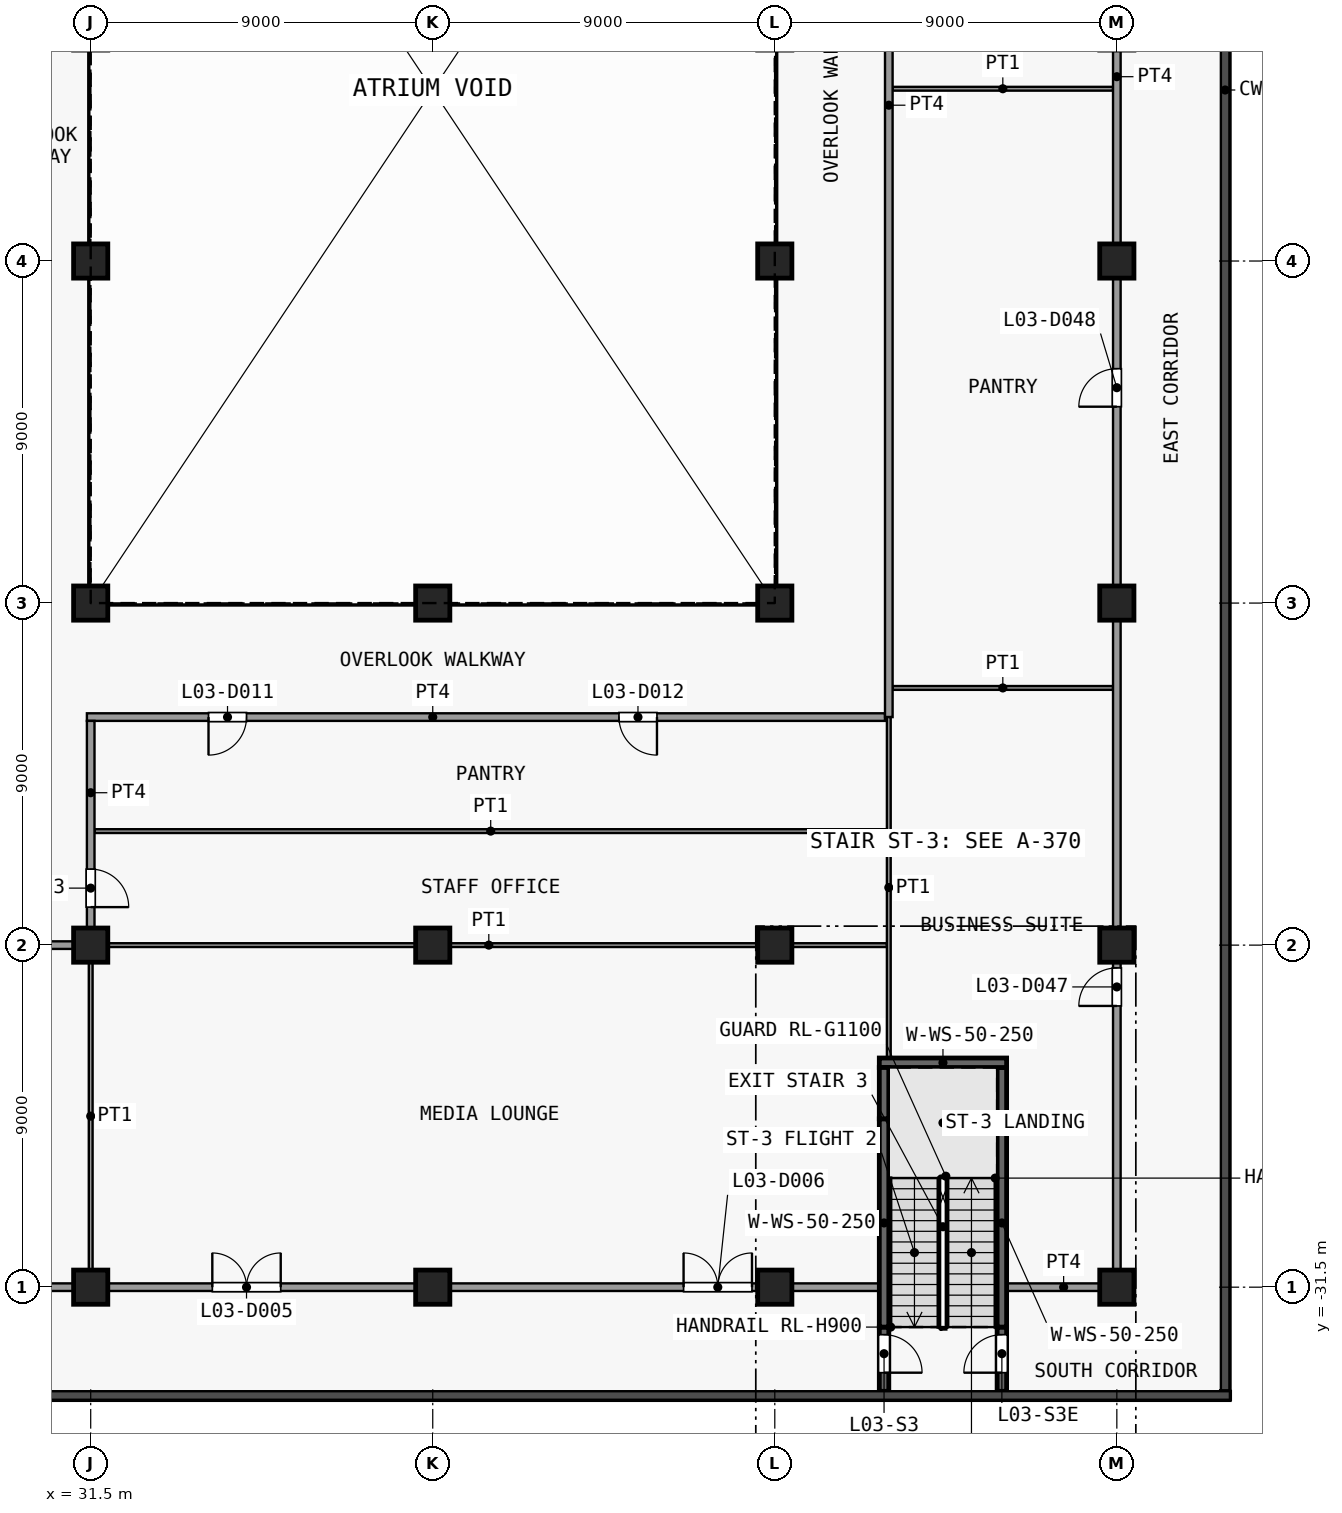
"""IFC4 building model, lengths in metres.
Left out: names, types, materials, properties, quantities, classifications, styles, units other than length and angle.
Written with IfcOpenShell. Run it as: python <this file> out.ifc"""

import sys

from ifc_helpers import new_model, si_unit, direction, frame, frame_2d, origin, origin_2d, place, context, subcontext, project, spatial, rectangle, extrude, element, fill, save


model = new_model("IFC4")
c1 = context("Model", 3, precision=1e-05, world=origin(), true_north=direction((0.0, 1.0)))
c2 = subcontext(c1, "Body", "Model", "MODEL_VIEW")
j1 = project(units=[si_unit("LENGTHUNIT", "METRE"), si_unit("PLANEANGLEUNIT", "RADIAN")], contexts=[c1])
p1 = place(None, origin())
s1 = spatial("IfcSite", under=j1, at=p1, CompositionType="ELEMENT")
p2 = place(p1, origin())
s2 = spatial("IfcBuilding", under=s1, at=p2, CompositionType="ELEMENT")
p3 = place(p2, frame((0.0, 0.0, 18.5)))
s3 = spatial("IfcBuildingStorey", under=s2, at=p3, CompositionType="ELEMENT", Elevation=18.5)
for number, where, z_axis, x_axis in (
    (1, (31.5, -31.5, 0.0), (0.0, 0.0, 1.0), (1.0, 0.0, 0.0)),
    (2, (31.5, -22.5, 0.0), (0.0, 0.0, 1.0), (1.0, 0.0, 0.0)),
    (3, (31.5, -13.5, 0.0), (0.0, 0.0, 1.0), (1.0, 0.0, 0.0)),
    (4, (31.5, -4.5, 0.0), (0.0, 0.0, 1.0), (1.0, 0.0, 0.0)),
    (5, (40.5, -31.5, 0.0), (0.0, 0.0, 1.0), (1.0, 0.0, 0.0)),
    (6, (40.5, -22.5, 0.0), (0.0, 0.0, 1.0), (1.0, 0.0, 0.0)),
    (7, (40.5, -13.5, 0.0), (0.0, 0.0, 1.0), (1.0, 0.0, 0.0)),
    (8, (49.5, -31.5, 0.0), (0.0, 0.0, 1.0), (1.0, 0.0, 0.0)),
    (9, (49.5, -22.5, 0.0), (0.0, 0.0, 1.0), (1.0, 0.0, 0.0)),
    (10, (49.5, -13.5, 0.0), (0.0, 0.0, 1.0), (1.0, 0.0, 0.0)),
    (11, (49.5, -4.5, 0.0), (0.0, 0.0, 1.0), (1.0, 0.0, 0.0)),
    (12, (58.5, -31.5, 0.0), (0.0, 0.0, 1.0), (1.0, 0.0, 0.0)),
    (13, (58.5, -22.5, 0.0), (0.0, 0.0, 1.0), (1.0, 0.0, 0.0)),
    (14, (58.5, -13.5, 0.0), (0.0, 0.0, 1.0), (1.0, 0.0, 0.0)),
    (15, (58.5, -4.5, 0.0), (0.0, 0.0, 1.0), (1.0, 0.0, 0.0)),
):
    element("IfcColumn", number, at=place(p3, frame(where, z_axis=z_axis, x_axis=x_axis)), inside=s3, PredefinedType="COLUMN", context=c2, shape_type="SweptSolid", body=[
        extrude(rectangle(XDim=0.9, YDim=0.9, at=origin_2d()), origin(), (0.0, 0.0, 1.0), 5.0),
    ])
p4 = place(p3, frame((52.375, -32.55, 0.0), z_axis=(0.0, 0.0, 1.0), x_axis=(0.0, -1.0, 0.0)))
e16 = element("IfcWall", 16, at=p4, inside=s3, PredefinedType="SHEAR", context=c2, shape_type="SweptSolid", body=[
    extrude(rectangle(XDim=1.69, YDim=0.25, at=frame_2d((0.845, 0.0))), origin(), (0.0, 0.0, 1.0), 4.65),
])
p5 = place(p4, frame((0.2, 0.0, 0.0)))
e17 = element("IfcOpeningElement", 17, at=p5, cuts=e16, PredefinedType="OPENING", context=c2, shape_type="SweptSolid", body=[
    extrude(rectangle(XDim=1.0, YDim=2.1, at=frame_2d((0.5, 1.05))), frame((0.0, 0.135, 0.0), z_axis=(0.0, -1.0, 0.0), x_axis=(1.0, 0.0, 0.0)), (0.0, 0.0, 1.0), 0.27),
])
p6 = place(p3, frame((52.375, -32.55, 0.0), z_axis=(0.0, 0.0, 1.0), x_axis=(0.0, 1.0, 0.0)))
e18 = element("IfcWall", 18, at=p6, inside=s3, PredefinedType="SHEAR", context=c2, shape_type="SweptSolid", body=[
    extrude(rectangle(XDim=5.48, YDim=0.25, at=frame_2d((2.74, 0.0))), origin(), (0.0, 0.0, 1.0), 4.65),
])
p7 = place(p3, frame((52.375, -27.07, 0.0), z_axis=(0.0, 0.0, 1.0), x_axis=(0.0, 1.0, 0.0)))
e19 = element("IfcWall", 19, at=p7, inside=s3, PredefinedType="SHEAR", context=c2, shape_type="SweptSolid", body=[
    extrude(rectangle(XDim=1.35, YDim=0.25, at=frame_2d((0.675, 0.0))), origin(), (0.0, 0.0, 1.0), 4.65),
])
p8 = place(p3, frame((55.475, -34.24, 0.0), z_axis=(0.0, 0.0, 1.0), x_axis=(0.0, 1.0, 0.0)))
e20 = element("IfcWall", 20, at=p8, inside=s3, PredefinedType="SHEAR", context=c2, shape_type="SweptSolid", body=[
    extrude(rectangle(XDim=1.69, YDim=0.25, at=frame_2d((0.845, 0.0))), origin(), (0.0, 0.0, 1.0), 4.65),
])
p9 = place(p8, frame((0.49, 0.0, 0.0)))
e21 = element("IfcOpeningElement", 21, at=p9, cuts=e20, PredefinedType="OPENING", context=c2, shape_type="SweptSolid", body=[
    extrude(rectangle(XDim=1.0, YDim=2.1, at=frame_2d((0.5, 1.05))), frame((0.0, 0.135, 0.0), z_axis=(0.0, -1.0, 0.0), x_axis=(1.0, 0.0, 0.0)), (0.0, 0.0, 1.0), 0.27),
])
p10 = place(p3, frame((55.475, -32.55, 0.0), z_axis=(0.0, 0.0, 1.0), x_axis=(0.0, 1.0, 0.0)))
e22 = element("IfcWall", 22, at=p10, inside=s3, PredefinedType="SHEAR", context=c2, shape_type="SweptSolid", body=[
    extrude(rectangle(XDim=5.48, YDim=0.25, at=frame_2d((2.74, 0.0))), origin(), (0.0, 0.0, 1.0), 4.65),
])
p11 = place(p3, frame((55.475, -27.07, 0.0), z_axis=(0.0, 0.0, 1.0), x_axis=(0.0, 1.0, 0.0)))
e23 = element("IfcWall", 23, at=p11, inside=s3, PredefinedType="SHEAR", context=c2, shape_type="SweptSolid", body=[
    extrude(rectangle(XDim=1.35, YDim=0.25, at=frame_2d((0.675, 0.0))), origin(), (0.0, 0.0, 1.0), 4.65),
])
p12 = place(p3, frame((52.25, -25.595, 0.0), z_axis=(0.0, 0.0, 1.0), x_axis=(1.0, 0.0, 0.0)))
e24 = element("IfcWall", 24, at=p12, inside=s3, PredefinedType="SHEAR", context=c2, shape_type="SweptSolid", body=[
    extrude(rectangle(XDim=3.35, YDim=0.25, at=frame_2d((1.675, 0.0))), origin(), (0.0, 0.0, 1.0), 4.65),
])
p13 = place(p3, frame((-25.9, -31.5, 0.0), z_axis=(0.0, 0.0, 1.0), x_axis=(1.0, 0.0, 0.0)))
e25 = element("IfcWall", 25, at=p13, inside=s3, PredefinedType="PARTITIONING", context=c2, shape_type="SweptSolid", body=[
    extrude(rectangle(XDim=78.15, YDim=0.2, at=frame_2d((39.075, 0.0))), origin(), (0.0, 0.0, 1.0), 4.65),
])
p14 = place(p13, frame((12.6, 0.0, 0.0)))
e26 = element("IfcOpeningElement", 26, at=p14, cuts=e25, PredefinedType="OPENING", context=c2, shape_type="SweptSolid", body=[
    extrude(rectangle(XDim=1.0, YDim=2.1, at=frame_2d((0.5, 1.05))), frame((0.0, 0.11, 0.0), z_axis=(0.0, -1.0, 0.0), x_axis=(1.0, 0.0, 0.0)), (0.0, 0.0, 1.0), 0.22),
])
p15 = place(p13, frame((25.2, 0.0, 0.0)))
e27 = element("IfcOpeningElement", 27, at=p15, cuts=e25, PredefinedType="OPENING", context=c2, shape_type="SweptSolid", body=[
    extrude(rectangle(XDim=1.0, YDim=2.1, at=frame_2d((0.5, 1.05))), frame((0.0, 0.11, 0.0), z_axis=(0.0, -1.0, 0.0), x_axis=(1.0, 0.0, 0.0)), (0.0, 0.0, 1.0), 0.22),
])
p16 = place(p13, frame((34.0, 0.0, 0.0)))
e28 = element("IfcOpeningElement", 28, at=p16, cuts=e25, PredefinedType="OPENING", context=c2, shape_type="SweptSolid", body=[
    extrude(rectangle(XDim=1.8, YDim=2.1, at=frame_2d((0.9, 1.05))), frame((0.0, 0.11, 0.0), z_axis=(0.0, -1.0, 0.0), x_axis=(1.0, 0.0, 0.0)), (0.0, 0.0, 1.0), 0.22),
])
p17 = place(p13, frame((51.0, 0.0, 0.0)))
e29 = element("IfcOpeningElement", 29, at=p17, cuts=e25, PredefinedType="OPENING", context=c2, shape_type="SweptSolid", body=[
    extrude(rectangle(XDim=1.8, YDim=2.1, at=frame_2d((0.9, 1.05))), frame((0.0, 0.11, 0.0), z_axis=(0.0, -1.0, 0.0), x_axis=(1.0, 0.0, 0.0)), (0.0, 0.0, 1.0), 0.22),
])
p18 = place(p13, frame((60.6, 0.0, 0.0)))
e30 = element("IfcOpeningElement", 30, at=p18, cuts=e25, PredefinedType="OPENING", context=c2, shape_type="SweptSolid", body=[
    extrude(rectangle(XDim=1.8, YDim=2.1, at=frame_2d((0.9, 1.05))), frame((0.0, 0.11, 0.0), z_axis=(0.0, -1.0, 0.0), x_axis=(1.0, 0.0, 0.0)), (0.0, 0.0, 1.0), 0.22),
])
p19 = place(p13, frame((73.0, 0.0, 0.0)))
e31 = element("IfcOpeningElement", 31, at=p19, cuts=e25, PredefinedType="OPENING", context=c2, shape_type="SweptSolid", body=[
    extrude(rectangle(XDim=1.8, YDim=2.1, at=frame_2d((0.9, 1.05))), frame((0.0, 0.11, 0.0), z_axis=(0.0, -1.0, 0.0), x_axis=(1.0, 0.0, 0.0)), (0.0, 0.0, 1.0), 0.22),
])
p20 = place(p3, frame((55.6, -31.5, 0.0), z_axis=(0.0, 0.0, 1.0), x_axis=(1.0, 0.0, 0.0)))
e32 = element("IfcWall", 32, at=p20, inside=s3, PredefinedType="PARTITIONING", context=c2, shape_type="SweptSolid", body=[
    extrude(rectangle(XDim=3.0, YDim=0.2, at=frame_2d((1.5, 0.0))), origin(), (0.0, 0.0, 1.0), 4.65),
])
p21 = place(p3, frame((17.4, -22.5, 0.0), z_axis=(0.0, 0.0, 1.0), x_axis=(1.0, 0.0, 0.0)))
e33 = element("IfcWall", 33, at=p21, inside=s3, PredefinedType="PARTITIONING", context=c2, shape_type="SweptSolid", body=[
    extrude(rectangle(XDim=14.1, YDim=0.2, at=frame_2d((7.05, 0.0))), origin(), (0.0, 0.0, 1.0), 4.65),
])
p22 = place(p3, frame((31.5, -22.5, 0.0), z_axis=(0.0, 0.0, 1.0), x_axis=(1.0, 0.0, 0.0)))
e34 = element("IfcWall", 34, at=p22, inside=s3, PredefinedType="PARTITIONING", context=c2, shape_type="SweptSolid", body=[
    extrude(rectangle(XDim=20.95, YDim=0.1, at=frame_2d((10.475, 0.0))), origin(), (0.0, 0.0, 1.0), 4.65),
])
p23 = place(p3, frame((31.6, -19.5, 0.0), z_axis=(0.0, 0.0, 1.0), x_axis=(1.0, 0.0, 0.0)))
e35 = element("IfcWall", 35, at=p23, inside=s3, PredefinedType="PARTITIONING", context=c2, shape_type="SweptSolid", body=[
    extrude(rectangle(XDim=20.85, YDim=0.1, at=frame_2d((10.425, 0.0))), origin(), (0.0, 0.0, 1.0), 4.65),
])
p24 = place(p3, frame((31.4, -16.5, 0.0), z_axis=(0.0, 0.0, 1.0), x_axis=(1.0, 0.0, 0.0)))
e36 = element("IfcWall", 36, at=p24, inside=s3, PredefinedType="PARTITIONING", context=c2, shape_type="SweptSolid", body=[
    extrude(rectangle(XDim=21.0, YDim=0.2, at=frame_2d((10.5, 0.0))), origin(), (0.0, 0.0, 1.0), 4.65),
])
p25 = place(p24, frame((3.2, 0.0, 0.0)))
e37 = element("IfcOpeningElement", 37, at=p25, cuts=e36, PredefinedType="OPENING", context=c2, shape_type="SweptSolid", body=[
    extrude(rectangle(XDim=1.0, YDim=2.1, at=frame_2d((0.5, 1.05))), frame((0.0, 0.11, 0.0), z_axis=(0.0, -1.0, 0.0), x_axis=(1.0, 0.0, 0.0)), (0.0, 0.0, 1.0), 0.22),
])
p26 = place(p24, frame((14.0, 0.0, 0.0)))
e38 = element("IfcOpeningElement", 38, at=p26, cuts=e36, PredefinedType="OPENING", context=c2, shape_type="SweptSolid", body=[
    extrude(rectangle(XDim=1.0, YDim=2.1, at=frame_2d((0.5, 1.05))), frame((0.0, 0.11, 0.0), z_axis=(0.0, -1.0, 0.0), x_axis=(1.0, 0.0, 0.0)), (0.0, 0.0, 1.0), 0.22),
])
for number, where, z_axis, x_axis in (
    (39, (52.6, -15.733, 0.0), (0.0, 0.0, 1.0), (1.0, 0.0, 0.0)),
    (40, (52.6, 0.033, 0.0), (0.0, 0.0, 1.0), (1.0, 0.0, 0.0)),
):
    element("IfcWall", number, at=place(p3, frame(where, z_axis=z_axis, x_axis=x_axis)), inside=s3, PredefinedType="PARTITIONING", context=c2, shape_type="SweptSolid", body=[
        extrude(rectangle(XDim=5.8, YDim=0.1, at=frame_2d((2.9, 0.0))), origin(), (0.0, 0.0, 1.0), 4.65),
    ])
p27 = place(p3, frame((31.5, -22.4, 0.0), z_axis=(0.0, 0.0, 1.0), x_axis=(0.0, 1.0, 0.0)))
e41 = element("IfcWall", 41, at=p27, inside=s3, PredefinedType="PARTITIONING", context=c2, shape_type="SweptSolid", body=[
    extrude(rectangle(XDim=5.8, YDim=0.2, at=frame_2d((2.9, 0.0))), origin(), (0.0, 0.0, 1.0), 4.65),
])
p28 = place(p27, frame((0.9, 0.0, 0.0)))
e42 = element("IfcOpeningElement", 42, at=p28, cuts=e41, PredefinedType="OPENING", context=c2, shape_type="SweptSolid", body=[
    extrude(rectangle(XDim=1.0, YDim=2.1, at=frame_2d((0.5, 1.05))), frame((0.0, 0.11, 0.0), z_axis=(0.0, -1.0, 0.0), x_axis=(1.0, 0.0, 0.0)), (0.0, 0.0, 1.0), 0.22),
])
p29 = place(p3, frame((31.5, -31.4, 0.0), z_axis=(0.0, 0.0, 1.0), x_axis=(0.0, 1.0, 0.0)))
e43 = element("IfcWall", 43, at=p29, inside=s3, PredefinedType="PARTITIONING", context=c2, shape_type="SweptSolid", body=[
    extrude(rectangle(XDim=8.8, YDim=0.1, at=frame_2d((4.4, 0.0))), origin(), (0.0, 0.0, 1.0), 4.65),
])
p30 = place(p3, frame((52.5, -16.5, 0.0), z_axis=(0.0, 0.0, 1.0), x_axis=(0.0, 1.0, 0.0)))
e44 = element("IfcWall", 44, at=p30, inside=s3, PredefinedType="PARTITIONING", context=c2, shape_type="SweptSolid", body=[
    extrude(rectangle(XDim=32.2, YDim=0.2, at=frame_2d((16.1, 0.0))), origin(), (0.0, 0.0, 1.0), 4.65),
])
p31 = place(p3, frame((52.5, -25.47, 0.0), z_axis=(0.0, 0.0, 1.0), x_axis=(0.0, 1.0, 0.0)))
e45 = element("IfcWall", 45, at=p31, inside=s3, PredefinedType="PARTITIONING", context=c2, shape_type="SweptSolid", body=[
    extrude(rectangle(XDim=8.97, YDim=0.1, at=frame_2d((4.485, 0.0))), origin(), (0.0, 0.0, 1.0), 4.65),
])
p32 = place(p3, frame((58.5, -31.4, 0.0), z_axis=(0.0, 0.0, 1.0), x_axis=(0.0, 1.0, 0.0)))
e46 = element("IfcWall", 46, at=p32, inside=s3, PredefinedType="PARTITIONING", context=c2, shape_type="SweptSolid", body=[
    extrude(rectangle(XDim=47.1, YDim=0.2, at=frame_2d((23.55, 0.0))), origin(), (0.0, 0.0, 1.0), 4.65),
])
p33 = place(p32, frame((7.3, 0.0, 0.0)))
e47 = element("IfcOpeningElement", 47, at=p33, cuts=e46, PredefinedType="OPENING", context=c2, shape_type="SweptSolid", body=[
    extrude(rectangle(XDim=1.0, YDim=2.1, at=frame_2d((0.5, 1.05))), frame((0.0, 0.11, 0.0), z_axis=(0.0, -1.0, 0.0), x_axis=(1.0, 0.0, 0.0)), (0.0, 0.0, 1.0), 0.22),
])
p34 = place(p32, frame((23.067, 0.0, 0.0)))
e48 = element("IfcOpeningElement", 48, at=p34, cuts=e46, PredefinedType="OPENING", context=c2, shape_type="SweptSolid", body=[
    extrude(rectangle(XDim=1.0, YDim=2.1, at=frame_2d((0.5, 1.05))), frame((0.0, 0.11, 0.0), z_axis=(0.0, -1.0, 0.0), x_axis=(1.0, 0.0, 0.0)), (0.0, 0.0, 1.0), 0.22),
])
p35 = place(p32, frame((39.433, 0.0, 0.0)))
e49 = element("IfcOpeningElement", 49, at=p35, cuts=e46, PredefinedType="OPENING", context=c2, shape_type="SweptSolid", body=[
    extrude(rectangle(XDim=1.0, YDim=2.1, at=frame_2d((0.5, 1.05))), frame((0.0, 0.11, 0.0), z_axis=(0.0, -1.0, 0.0), x_axis=(1.0, 0.0, 0.0)), (0.0, 0.0, 1.0), 0.22),
])
p36 = place(p5, origin())
e50 = element("IfcDoor", 50, at=p36, inside=s3, OperationType="SINGLE_SWING_RIGHT", PredefinedType="DOOR", context=c2, shape_type="SweptSolid", body=[
    extrude(rectangle(XDim=1.0, YDim=2.1, at=frame_2d((0.5, 1.05))), frame((0.0, 0.025, 0.0), z_axis=(0.0, -1.0, 0.0), x_axis=(1.0, 0.0, 0.0)), (0.0, 0.0, 1.0), 0.05),
])
fill(e17, e50)
p37 = place(p9, origin())
e51 = element("IfcDoor", 51, at=p37, inside=s3, OperationType="SINGLE_SWING_LEFT", PredefinedType="DOOR", context=c2, shape_type="SweptSolid", body=[
    extrude(rectangle(XDim=1.0, YDim=2.1, at=frame_2d((0.5, 1.05))), frame((0.0, 0.025, 0.0), z_axis=(0.0, -1.0, 0.0), x_axis=(1.0, 0.0, 0.0)), (0.0, 0.0, 1.0), 0.05),
])
fill(e21, e51)
p38 = place(p18, origin())
e52 = element("IfcDoor", 52, at=p38, inside=s3, OperationType="DOUBLE_DOOR_SINGLE_SWING", PredefinedType="DOOR", context=c2, shape_type="SweptSolid", body=[
    extrude(rectangle(XDim=1.8, YDim=2.1, at=frame_2d((0.9, 1.05))), frame((0.0, 0.025, 0.0), z_axis=(0.0, -1.0, 0.0), x_axis=(1.0, 0.0, 0.0)), (0.0, 0.0, 1.0), 0.05),
])
fill(e30, e52)
p39 = place(p19, origin())
e53 = element("IfcDoor", 53, at=p39, inside=s3, OperationType="DOUBLE_DOOR_SINGLE_SWING", PredefinedType="DOOR", context=c2, shape_type="SweptSolid", body=[
    extrude(rectangle(XDim=1.8, YDim=2.1, at=frame_2d((0.9, 1.05))), frame((0.0, 0.025, 0.0), z_axis=(0.0, -1.0, 0.0), x_axis=(1.0, 0.0, 0.0)), (0.0, 0.0, 1.0), 0.05),
])
fill(e31, e53)
p40 = place(p25, origin())
e54 = element("IfcDoor", 54, at=p40, inside=s3, OperationType="SINGLE_SWING_LEFT", PredefinedType="DOOR", context=c2, shape_type="SweptSolid", body=[
    extrude(rectangle(XDim=1.0, YDim=2.1, at=frame_2d((0.5, 1.05))), frame((0.0, 0.025, 0.0), z_axis=(0.0, -1.0, 0.0), x_axis=(1.0, 0.0, 0.0)), (0.0, 0.0, 1.0), 0.05),
])
fill(e37, e54)
p41 = place(p26, origin())
e55 = element("IfcDoor", 55, at=p41, inside=s3, OperationType="SINGLE_SWING_RIGHT", PredefinedType="DOOR", context=c2, shape_type="SweptSolid", body=[
    extrude(rectangle(XDim=1.0, YDim=2.1, at=frame_2d((0.5, 1.05))), frame((0.0, 0.025, 0.0), z_axis=(0.0, -1.0, 0.0), x_axis=(1.0, 0.0, 0.0)), (0.0, 0.0, 1.0), 0.05),
])
fill(e38, e55)
p42 = place(p28, origin())
e56 = element("IfcDoor", 56, at=p42, inside=s3, OperationType="SINGLE_SWING_LEFT", PredefinedType="DOOR", context=c2, shape_type="SweptSolid", body=[
    extrude(rectangle(XDim=1.0, YDim=2.1, at=frame_2d((0.5, 1.05))), frame((0.0, 0.025, 0.0), z_axis=(0.0, -1.0, 0.0), x_axis=(1.0, 0.0, 0.0)), (0.0, 0.0, 1.0), 0.05),
])
fill(e42, e56)
p43 = place(p33, origin())
e57 = element("IfcDoor", 57, at=p43, inside=s3, OperationType="SINGLE_SWING_RIGHT", PredefinedType="DOOR", context=c2, shape_type="SweptSolid", body=[
    extrude(rectangle(XDim=1.0, YDim=2.1, at=frame_2d((0.5, 1.05))), frame((0.0, 0.025, 0.0), z_axis=(0.0, -1.0, 0.0), x_axis=(1.0, 0.0, 0.0)), (0.0, 0.0, 1.0), 0.05),
])
fill(e47, e57)
p44 = place(p34, origin())
e58 = element("IfcDoor", 58, at=p44, inside=s3, OperationType="SINGLE_SWING_RIGHT", PredefinedType="DOOR", context=c2, shape_type="SweptSolid", body=[
    extrude(rectangle(XDim=1.0, YDim=2.1, at=frame_2d((0.5, 1.05))), frame((0.0, 0.025, 0.0), z_axis=(0.0, -1.0, 0.0), x_axis=(1.0, 0.0, 0.0)), (0.0, 0.0, 1.0), 0.05),
])
fill(e48, e58)
save(model, sys.argv[1])
